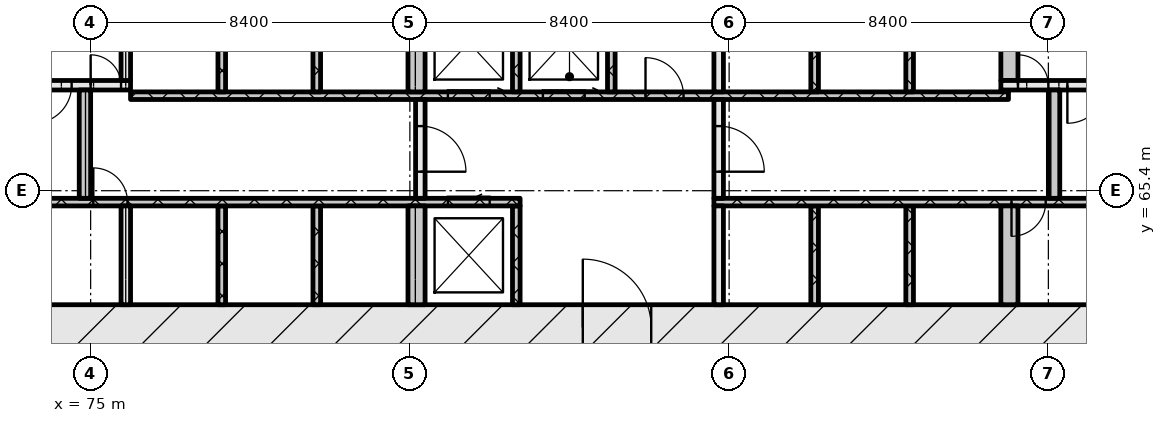
"""IFC4 building model, lengths in metres.
Left out: names, types, materials, properties, quantities, classifications, styles, units other than length and angle.
Written with IfcOpenShell. Run it as: python <this file> out.ifc"""

import sys

from ifc_helpers import new_model, si_unit, direction, frame, frame_2d, origin, place, context, subcontext, project, spatial, rectangle, extrude, element, fill, save


model = new_model("IFC4")
c1 = context("Model", 3, precision=1e-05, world=origin(), true_north=direction((0.0, 1.0)))
c2 = subcontext(c1, "Body", "Model", "MODEL_VIEW")
j1 = project(units=[si_unit("LENGTHUNIT", "METRE"), si_unit("PLANEANGLEUNIT", "RADIAN")], contexts=[c1])
p1 = place(None, origin())
s1 = spatial("IfcSite", under=j1, at=p1, CompositionType="ELEMENT")
p2 = place(p1, origin())
s2 = spatial("IfcBuilding", under=s1, at=p2, CompositionType="ELEMENT")
p3 = place(p2, frame((0.0, 0.0, 14.4)))
s3 = spatial("IfcBuildingStorey", under=s2, at=p3, CompositionType="ELEMENT", Elevation=14.4)
p4 = place(p3, frame((66.6, 61.8, 0.0), z_axis=(0.0, 0.0, 1.0), x_axis=(1.0, 0.0, 0.0)))
e1 = element("IfcWall", 1, at=p4, inside=s3, PredefinedType="SOLIDWALL", context=c2, shape_type="SweptSolid", body=[
    extrude(rectangle(XDim=42.0, YDim=1.2, at=frame_2d((21.0, 0.0))), origin(), (0.0, 0.0, 1.0), 4.5),
])
p5 = place(p4, frame((21.35, 0.0, 0.0)))
e2 = element("IfcOpeningElement", 2, at=p5, cuts=e1, PredefinedType="OPENING", context=c2, shape_type="SweptSolid", body=[
    extrude(rectangle(XDim=1.8, YDim=2.1, at=frame_2d((0.9, 1.05))), frame((0.0, 0.61, 0.0), z_axis=(0.0, -1.0, 0.0), x_axis=(1.0, 0.0, 0.0)), (0.0, 0.0, 1.0), 1.22),
])
p6 = place(p3, frame((75.925, 62.4, 0.0), z_axis=(0.0, 0.0, 1.0), x_axis=(0.0, 1.0, 0.0)))
e3 = element("IfcWall", 3, at=p6, inside=s3, PredefinedType="SOLIDWALL", context=c2, shape_type="SweptSolid", body=[
    extrude(rectangle(XDim=2.6, YDim=0.25, at=frame_2d((1.3, 0.0))), origin(), (0.0, 0.0, 1.0), 4.5),
])
for number, where, z_axis, x_axis in (
    (4, (78.45, 62.4, 0.0), (0.0, 0.0, 1.0), (0.0, 1.0, 0.0)),
    (5, (80.95, 62.4, 0.0), (0.0, 0.0, 1.0), (0.0, 1.0, 0.0)),
):
    element("IfcWall", number, at=place(p3, frame(where, z_axis=z_axis, x_axis=x_axis)), inside=s3, PredefinedType="SOLIDWALL", context=c2, shape_type="SweptSolid", body=[
        extrude(rectangle(XDim=2.6, YDim=0.2, at=frame_2d((1.3, 0.0))), origin(), (0.0, 0.0, 1.0), 4.5),
    ])
p7 = place(p3, frame((83.575, 62.4, 0.0), z_axis=(0.0, 0.0, 1.0), x_axis=(0.0, 1.0, 0.0)))
e6 = element("IfcWall", 6, at=p7, inside=s3, PredefinedType="SOLIDWALL", context=c2, shape_type="SweptSolid", body=[
    extrude(rectangle(XDim=2.6, YDim=0.45, at=frame_2d((1.3, 0.0))), origin(), (0.0, 0.0, 1.0), 4.5),
])
p8 = place(p3, frame((86.2, 62.4, 0.0), z_axis=(0.0, 0.0, 1.0), x_axis=(0.0, 1.0, 0.0)))
e7 = element("IfcWall", 7, at=p8, inside=s3, PredefinedType="SOLIDWALL", context=c2, shape_type="SweptSolid", body=[
    extrude(rectangle(XDim=2.6, YDim=0.2, at=frame_2d((1.3, 0.0))), origin(), (0.0, 0.0, 1.0), 4.5),
])
p9 = place(p3, frame((91.525, 62.4, 0.0), z_axis=(0.0, 0.0, 1.0), x_axis=(0.0, 1.0, 0.0)))
e8 = element("IfcWall", 8, at=p9, inside=s3, PredefinedType="SOLIDWALL", context=c2, shape_type="SweptSolid", body=[
    extrude(rectangle(XDim=2.6, YDim=0.25, at=frame_2d((1.3, 0.0))), origin(), (0.0, 0.0, 1.0), 4.5),
])
for number, where, z_axis, x_axis in (
    (9, (94.05, 62.4, 0.0), (0.0, 0.0, 1.0), (0.0, 1.0, 0.0)),
    (10, (96.55, 62.4, 0.0), (0.0, 0.0, 1.0), (0.0, 1.0, 0.0)),
):
    element("IfcWall", number, at=place(p3, frame(where, z_axis=z_axis, x_axis=x_axis)), inside=s3, PredefinedType="SOLIDWALL", context=c2, shape_type="SweptSolid", body=[
        extrude(rectangle(XDim=2.6, YDim=0.2, at=frame_2d((1.3, 0.0))), origin(), (0.0, 0.0, 1.0), 4.5),
    ])
p10 = place(p3, frame((99.175, 62.4, 0.0), z_axis=(0.0, 0.0, 1.0), x_axis=(0.0, 1.0, 0.0)))
e11 = element("IfcWall", 11, at=p10, inside=s3, PredefinedType="SOLIDWALL", context=c2, shape_type="SweptSolid", body=[
    extrude(rectangle(XDim=2.6, YDim=0.45, at=frame_2d((1.3, 0.0))), origin(), (0.0, 0.0, 1.0), 4.5),
])
p11 = place(p3, frame((67.8, 65.1, 0.0), z_axis=(0.0, 0.0, 1.0), x_axis=(1.0, 0.0, 0.0)))
e12 = element("IfcWall", 12, at=p11, inside=s3, PredefinedType="SOLIDWALL", context=c2, shape_type="SweptSolid", body=[
    extrude(rectangle(XDim=18.5, YDim=0.2, at=frame_2d((9.25, 0.0))), origin(), (0.0, 0.0, 1.0), 4.5),
])
p12 = place(p11, frame((7.27, 0.0, 0.0)))
e13 = element("IfcOpeningElement", 13, at=p12, cuts=e12, PredefinedType="OPENING", context=c2, shape_type="SweptSolid", body=[
    extrude(rectangle(XDim=0.9, YDim=2.1, at=frame_2d((0.45, 1.05))), frame((0.0, 0.11, 0.0), z_axis=(0.0, -1.0, 0.0), x_axis=(1.0, 0.0, 0.0)), (0.0, 0.0, 1.0), 0.22),
])
p13 = place(p11, frame((16.6, 0.0, 0.0)))
e14 = element("IfcOpeningElement", 14, at=p13, cuts=e12, PredefinedType="OPENING", context=c2, shape_type="SweptSolid", body=[
    extrude(rectangle(XDim=1.1, YDim=2.1, at=frame_2d((0.55, 1.05))), frame((0.0, 0.11, 0.0), z_axis=(0.0, -1.0, 0.0), x_axis=(1.0, 0.0, 0.0)), (0.0, 0.0, 1.0), 0.22),
])
p14 = place(p3, frame((91.4, 65.1, 0.0), z_axis=(0.0, 0.0, 1.0), x_axis=(1.0, 0.0, 0.0)))
e15 = element("IfcWall", 15, at=p14, inside=s3, PredefinedType="SOLIDWALL", context=c2, shape_type="SweptSolid", body=[
    extrude(rectangle(XDim=16.0, YDim=0.2, at=frame_2d((8.0, 0.0))), origin(), (0.0, 0.0, 1.0), 4.5),
])
p15 = place(p14, frame((7.83, 0.0, 0.0)))
e16 = element("IfcOpeningElement", 16, at=p15, cuts=e15, PredefinedType="OPENING", context=c2, shape_type="SweptSolid", body=[
    extrude(rectangle(XDim=0.9, YDim=2.1, at=frame_2d((0.45, 1.05))), frame((0.0, 0.11, 0.0), z_axis=(0.0, -1.0, 0.0), x_axis=(1.0, 0.0, 0.0)), (0.0, 0.0, 1.0), 0.22),
])
p16 = place(p3, frame((74.85, 65.2, 0.0), z_axis=(0.0, 0.0, 1.0), x_axis=(0.0, 1.0, 0.0)))
e17 = element("IfcWall", 17, at=p16, inside=s3, PredefinedType="SOLIDWALL", context=c2, shape_type="SweptSolid", body=[
    extrude(rectangle(XDim=2.85, YDim=0.3, at=frame_2d((1.425, 0.0))), origin(), (0.0, 0.0, 1.0), 4.5),
])
p17 = place(p3, frame((83.675, 65.2, 0.0), z_axis=(0.0, 0.0, 1.0), x_axis=(0.0, 1.0, 0.0)))
e18 = element("IfcWall", 18, at=p17, inside=s3, PredefinedType="SOLIDWALL", context=c2, shape_type="SweptSolid", body=[
    extrude(rectangle(XDim=2.6, YDim=0.25, at=frame_2d((1.3, 0.0))), origin(), (0.0, 0.0, 1.0), 4.5),
])
p18 = place(p17, frame((0.7, 0.0, 0.0)))
e19 = element("IfcOpeningElement", 19, at=p18, cuts=e18, PredefinedType="OPENING", context=c2, shape_type="SweptSolid", body=[
    extrude(rectangle(XDim=1.2, YDim=2.1, at=frame_2d((0.6, 1.05))), frame((0.0, 0.135, 0.0), z_axis=(0.0, -1.0, 0.0), x_axis=(1.0, 0.0, 0.0)), (0.0, 0.0, 1.0), 0.27),
])
p19 = place(p3, frame((91.525, 65.2, 0.0), z_axis=(0.0, 0.0, 1.0), x_axis=(0.0, 1.0, 0.0)))
e20 = element("IfcWall", 20, at=p19, inside=s3, PredefinedType="SOLIDWALL", context=c2, shape_type="SweptSolid", body=[
    extrude(rectangle(XDim=2.6, YDim=0.25, at=frame_2d((1.3, 0.0))), origin(), (0.0, 0.0, 1.0), 4.5),
])
p20 = place(p19, frame((0.7, 0.0, 0.0)))
e21 = element("IfcOpeningElement", 21, at=p20, cuts=e20, PredefinedType="OPENING", context=c2, shape_type="SweptSolid", body=[
    extrude(rectangle(XDim=1.2, YDim=2.1, at=frame_2d((0.6, 1.05))), frame((0.0, 0.135, 0.0), z_axis=(0.0, -1.0, 0.0), x_axis=(1.0, 0.0, 0.0)), (0.0, 0.0, 1.0), 0.27),
])
p21 = place(p3, frame((100.35, 65.2, 0.0), z_axis=(0.0, 0.0, 1.0), x_axis=(0.0, 1.0, 0.0)))
e22 = element("IfcWall", 22, at=p21, inside=s3, PredefinedType="SOLIDWALL", context=c2, shape_type="SweptSolid", body=[
    extrude(rectangle(XDim=2.85, YDim=0.3, at=frame_2d((1.425, 0.0))), origin(), (0.0, 0.0, 1.0), 4.5),
])
p22 = place(p3, frame((76.05, 67.9, 0.0), z_axis=(0.0, 0.0, 1.0), x_axis=(1.0, 0.0, 0.0)))
e23 = element("IfcWall", 23, at=p22, inside=s3, PredefinedType="SOLIDWALL", context=c2, shape_type="SweptSolid", body=[
    extrude(rectangle(XDim=23.1, YDim=0.2, at=frame_2d((11.55, 0.0))), origin(), (0.0, 0.0, 1.0), 4.5),
])
p23 = place(p22, frame((8.35, 0.0, 0.0)))
e24 = element("IfcOpeningElement", 24, at=p23, cuts=e23, PredefinedType="OPENING", context=c2, shape_type="SweptSolid", body=[
    extrude(rectangle(XDim=1.1, YDim=2.1, at=frame_2d((0.55, 1.05))), frame((0.0, 0.11, 0.0), z_axis=(0.0, -1.0, 0.0), x_axis=(1.0, 0.0, 0.0)), (0.0, 0.0, 1.0), 0.22),
])
p24 = place(p22, frame((10.85, 0.0, 0.0)))
e25 = element("IfcOpeningElement", 25, at=p24, cuts=e23, PredefinedType="OPENING", context=c2, shape_type="SweptSolid", body=[
    extrude(rectangle(XDim=1.1, YDim=2.1, at=frame_2d((0.55, 1.05))), frame((0.0, 0.11, 0.0), z_axis=(0.0, -1.0, 0.0), x_axis=(1.0, 0.0, 0.0)), (0.0, 0.0, 1.0), 0.22),
])
p25 = place(p22, frame((13.55, 0.0, 0.0)))
e26 = element("IfcOpeningElement", 26, at=p25, cuts=e23, PredefinedType="OPENING", context=c2, shape_type="SweptSolid", body=[
    extrude(rectangle(XDim=1.0, YDim=2.1, at=frame_2d((0.5, 1.05))), frame((0.0, 0.11, 0.0), z_axis=(0.0, -1.0, 0.0), x_axis=(1.0, 0.0, 0.0)), (0.0, 0.0, 1.0), 0.22),
])
for number, where, z_axis, x_axis in (
    (27, (78.45, 68.0, 0.0), (0.0, 0.0, 1.0), (0.0, 1.0, 0.0)),
    (28, (80.95, 68.0, 0.0), (0.0, 0.0, 1.0), (0.0, 1.0, 0.0)),
):
    element("IfcWall", number, at=place(p3, frame(where, z_axis=z_axis, x_axis=x_axis)), inside=s3, PredefinedType="SOLIDWALL", context=c2, shape_type="SweptSolid", body=[
        extrude(rectangle(XDim=2.6, YDim=0.2, at=frame_2d((1.3, 0.0))), origin(), (0.0, 0.0, 1.0), 4.5),
    ])
p26 = place(p3, frame((83.575, 68.0, 0.0), z_axis=(0.0, 0.0, 1.0), x_axis=(0.0, 1.0, 0.0)))
e29 = element("IfcWall", 29, at=p26, inside=s3, PredefinedType="SOLIDWALL", context=c2, shape_type="SweptSolid", body=[
    extrude(rectangle(XDim=2.6, YDim=0.45, at=frame_2d((1.3, 0.0))), origin(), (0.0, 0.0, 1.0), 4.5),
])
for number, where, z_axis, x_axis in (
    (30, (86.2, 68.0, 0.0), (0.0, 0.0, 1.0), (0.0, 1.0, 0.0)),
    (31, (88.7, 68.0, 0.0), (0.0, 0.0, 1.0), (0.0, 1.0, 0.0)),
):
    element("IfcWall", number, at=place(p3, frame(where, z_axis=z_axis, x_axis=x_axis)), inside=s3, PredefinedType="SOLIDWALL", context=c2, shape_type="SweptSolid", body=[
        extrude(rectangle(XDim=2.6, YDim=0.2, at=frame_2d((1.3, 0.0))), origin(), (0.0, 0.0, 1.0), 4.5),
    ])
p27 = place(p3, frame((91.525, 68.0, 0.0), z_axis=(0.0, 0.0, 1.0), x_axis=(0.0, 1.0, 0.0)))
e32 = element("IfcWall", 32, at=p27, inside=s3, PredefinedType="SOLIDWALL", context=c2, shape_type="SweptSolid", body=[
    extrude(rectangle(XDim=2.6, YDim=0.25, at=frame_2d((1.3, 0.0))), origin(), (0.0, 0.0, 1.0), 4.5),
])
for number, where, z_axis, x_axis in (
    (33, (94.05, 68.0, 0.0), (0.0, 0.0, 1.0), (0.0, 1.0, 0.0)),
    (34, (96.55, 68.0, 0.0), (0.0, 0.0, 1.0), (0.0, 1.0, 0.0)),
):
    element("IfcWall", number, at=place(p3, frame(where, z_axis=z_axis, x_axis=x_axis)), inside=s3, PredefinedType="SOLIDWALL", context=c2, shape_type="SweptSolid", body=[
        extrude(rectangle(XDim=2.6, YDim=0.2, at=frame_2d((1.3, 0.0))), origin(), (0.0, 0.0, 1.0), 4.5),
    ])
p28 = place(p3, frame((98.95, 68.025, 0.0), z_axis=(0.0, 0.0, 1.0), x_axis=(1.0, 0.0, 0.0)))
e35 = element("IfcWall", 35, at=p28, inside=s3, PredefinedType="SOLIDWALL", context=c2, shape_type="SweptSolid", body=[
    extrude(rectangle(XDim=0.2, YDim=0.05, at=frame_2d((0.1, 0.0))), origin(), (0.0, 0.0, 1.0), 4.5),
])
p29 = place(p3, frame((67.8, 68.175, 0.0), z_axis=(0.0, 0.0, 1.0), x_axis=(1.0, 0.0, 0.0)))
e36 = element("IfcWall", 36, at=p29, inside=s3, PredefinedType="SOLIDWALL", context=c2, shape_type="SweptSolid", body=[
    extrude(rectangle(XDim=8.25, YDim=0.25, at=frame_2d((4.125, 0.0))), origin(), (0.0, 0.0, 1.0), 4.5),
])
p30 = place(p29, frame((5.7, 0.0, 0.0)))
e37 = element("IfcOpeningElement", 37, at=p30, cuts=e36, PredefinedType="OPENING", context=c2, shape_type="SweptSolid", body=[
    extrude(rectangle(XDim=1.0, YDim=2.1, at=frame_2d((0.5, 1.05))), frame((0.0, 0.135, 0.0), z_axis=(0.0, -1.0, 0.0), x_axis=(1.0, 0.0, 0.0)), (0.0, 0.0, 1.0), 0.27),
])
p31 = place(p29, frame((7.2, 0.0, 0.0)))
e38 = element("IfcOpeningElement", 38, at=p31, cuts=e36, PredefinedType="OPENING", context=c2, shape_type="SweptSolid", body=[
    extrude(rectangle(XDim=0.8, YDim=2.1, at=frame_2d((0.4, 1.05))), frame((0.0, 0.135, 0.0), z_axis=(0.0, -1.0, 0.0), x_axis=(1.0, 0.0, 0.0)), (0.0, 0.0, 1.0), 0.27),
])
p32 = place(p3, frame((98.95, 68.175, 0.0), z_axis=(0.0, 0.0, 1.0), x_axis=(1.0, 0.0, 0.0)))
e39 = element("IfcWall", 39, at=p32, inside=s3, PredefinedType="SOLIDWALL", context=c2, shape_type="SweptSolid", body=[
    extrude(rectangle(XDim=8.45, YDim=0.25, at=frame_2d((4.225, 0.0))), origin(), (0.0, 0.0, 1.0), 4.5),
])
p33 = place(p32, frame((0.45, 0.0, 0.0)))
e40 = element("IfcOpeningElement", 40, at=p33, cuts=e39, PredefinedType="OPENING", context=c2, shape_type="SweptSolid", body=[
    extrude(rectangle(XDim=0.8, YDim=2.1, at=frame_2d((0.4, 1.05))), frame((0.0, 0.135, 0.0), z_axis=(0.0, -1.0, 0.0), x_axis=(1.0, 0.0, 0.0)), (0.0, 0.0, 1.0), 0.27),
])
p34 = place(p32, frame((1.75, 0.0, 0.0)))
e41 = element("IfcOpeningElement", 41, at=p34, cuts=e39, PredefinedType="OPENING", context=c2, shape_type="SweptSolid", body=[
    extrude(rectangle(XDim=1.0, YDim=2.1, at=frame_2d((0.5, 1.05))), frame((0.0, 0.135, 0.0), z_axis=(0.0, -1.0, 0.0), x_axis=(1.0, 0.0, 0.0)), (0.0, 0.0, 1.0), 0.27),
])
p35 = place(p3, frame((75.925, 68.3, 0.0), z_axis=(0.0, 0.0, 1.0), x_axis=(0.0, 1.0, 0.0)))
e42 = element("IfcWall", 42, at=p35, inside=s3, PredefinedType="SOLIDWALL", context=c2, shape_type="SweptSolid", body=[
    extrude(rectangle(XDim=2.3, YDim=0.25, at=frame_2d((1.15, 0.0))), origin(), (0.0, 0.0, 1.0), 4.5),
])
p36 = place(p3, frame((99.175, 68.3, 0.0), z_axis=(0.0, 0.0, 1.0), x_axis=(0.0, 1.0, 0.0)))
e43 = element("IfcWall", 43, at=p36, inside=s3, PredefinedType="SOLIDWALL", context=c2, shape_type="SweptSolid", body=[
    extrude(rectangle(XDim=2.3, YDim=0.45, at=frame_2d((1.15, 0.0))), origin(), (0.0, 0.0, 1.0), 4.5),
])
p37 = place(p5, origin())
e44 = element("IfcDoor", 44, at=p37, inside=s3, OperationType="DOUBLE_DOOR_SINGLE_SWING", PredefinedType="DOOR", context=c2, shape_type="SweptSolid", body=[
    extrude(rectangle(XDim=1.8, YDim=2.1, at=frame_2d((0.9, 1.05))), frame((0.0, 0.025, 0.0), z_axis=(0.0, -1.0, 0.0), x_axis=(1.0, 0.0, 0.0)), (0.0, 0.0, 1.0), 0.05),
])
fill(e2, e44)
p38 = place(p12, origin())
e45 = element("IfcDoor", 45, at=p38, inside=s3, OperationType="SINGLE_SWING_LEFT", PredefinedType="DOOR", context=c2, shape_type="SweptSolid", body=[
    extrude(rectangle(XDim=0.9, YDim=2.1, at=frame_2d((0.45, 1.05))), frame((0.0, 0.025, 0.0), z_axis=(0.0, -1.0, 0.0), x_axis=(1.0, 0.0, 0.0)), (0.0, 0.0, 1.0), 0.05),
])
fill(e13, e45)
p39 = place(p13, origin())
e46 = element("IfcDoor", 46, at=p39, inside=s3, OperationType="SLIDING_TO_LEFT", PredefinedType="DOOR", context=c2, shape_type="SweptSolid", body=[
    extrude(rectangle(XDim=1.1, YDim=2.1, at=frame_2d((0.55, 1.05))), frame((0.0, 0.025, 0.0), z_axis=(0.0, -1.0, 0.0), x_axis=(1.0, 0.0, 0.0)), (0.0, 0.0, 1.0), 0.05),
])
fill(e14, e46)
p40 = place(p15, origin())
e47 = element("IfcDoor", 47, at=p40, inside=s3, OperationType="SINGLE_SWING_RIGHT", PredefinedType="DOOR", context=c2, shape_type="SweptSolid", body=[
    extrude(rectangle(XDim=0.9, YDim=2.1, at=frame_2d((0.45, 1.05))), frame((0.0, 0.025, 0.0), z_axis=(0.0, -1.0, 0.0), x_axis=(1.0, 0.0, 0.0)), (0.0, 0.0, 1.0), 0.05),
])
fill(e16, e47)
p41 = place(p18, origin())
e48 = element("IfcDoor", 48, at=p41, inside=s3, OperationType="SINGLE_SWING_RIGHT", PredefinedType="DOOR", context=c2, shape_type="SweptSolid", body=[
    extrude(rectangle(XDim=1.2, YDim=2.1, at=frame_2d((0.6, 1.05))), frame((0.0, 0.025, 0.0), z_axis=(0.0, -1.0, 0.0), x_axis=(1.0, 0.0, 0.0)), (0.0, 0.0, 1.0), 0.05),
])
fill(e19, e48)
p42 = place(p20, origin())
e49 = element("IfcDoor", 49, at=p42, inside=s3, OperationType="SINGLE_SWING_RIGHT", PredefinedType="DOOR", context=c2, shape_type="SweptSolid", body=[
    extrude(rectangle(XDim=1.2, YDim=2.1, at=frame_2d((0.6, 1.05))), frame((0.0, 0.025, 0.0), z_axis=(0.0, -1.0, 0.0), x_axis=(1.0, 0.0, 0.0)), (0.0, 0.0, 1.0), 0.05),
])
fill(e21, e49)
p43 = place(p23, origin())
e50 = element("IfcDoor", 50, at=p43, inside=s3, OperationType="SLIDING_TO_RIGHT", PredefinedType="DOOR", context=c2, shape_type="SweptSolid", body=[
    extrude(rectangle(XDim=1.1, YDim=2.1, at=frame_2d((0.55, 1.05))), frame((0.0, 0.025, 0.0), z_axis=(0.0, -1.0, 0.0), x_axis=(1.0, 0.0, 0.0)), (0.0, 0.0, 1.0), 0.05),
])
fill(e24, e50)
p44 = place(p24, origin())
e51 = element("IfcDoor", 51, at=p44, inside=s3, OperationType="SLIDING_TO_RIGHT", PredefinedType="DOOR", context=c2, shape_type="SweptSolid", body=[
    extrude(rectangle(XDim=1.1, YDim=2.1, at=frame_2d((0.55, 1.05))), frame((0.0, 0.025, 0.0), z_axis=(0.0, -1.0, 0.0), x_axis=(1.0, 0.0, 0.0)), (0.0, 0.0, 1.0), 0.05),
])
fill(e25, e51)
p45 = place(p25, origin())
e52 = element("IfcDoor", 52, at=p45, inside=s3, OperationType="SINGLE_SWING_LEFT", PredefinedType="DOOR", context=c2, shape_type="SweptSolid", body=[
    extrude(rectangle(XDim=1.0, YDim=2.1, at=frame_2d((0.5, 1.05))), frame((0.0, 0.025, 0.0), z_axis=(0.0, -1.0, 0.0), x_axis=(1.0, 0.0, 0.0)), (0.0, 0.0, 1.0), 0.05),
])
fill(e26, e52)
p46 = place(p30, origin())
e53 = element("IfcDoor", 53, at=p46, inside=s3, OperationType="SINGLE_SWING_RIGHT", PredefinedType="DOOR", context=c2, shape_type="SweptSolid", body=[
    extrude(rectangle(XDim=1.0, YDim=2.1, at=frame_2d((0.5, 1.05))), frame((0.0, 0.025, 0.0), z_axis=(0.0, -1.0, 0.0), x_axis=(1.0, 0.0, 0.0)), (0.0, 0.0, 1.0), 0.05),
])
fill(e37, e53)
p47 = place(p31, origin())
e54 = element("IfcDoor", 54, at=p47, inside=s3, OperationType="SINGLE_SWING_LEFT", PredefinedType="DOOR", context=c2, shape_type="SweptSolid", body=[
    extrude(rectangle(XDim=0.8, YDim=2.1, at=frame_2d((0.4, 1.05))), frame((0.0, 0.025, 0.0), z_axis=(0.0, -1.0, 0.0), x_axis=(1.0, 0.0, 0.0)), (0.0, 0.0, 1.0), 0.05),
])
fill(e38, e54)
p48 = place(p33, origin())
e55 = element("IfcDoor", 55, at=p48, inside=s3, OperationType="SINGLE_SWING_LEFT", PredefinedType="DOOR", context=c2, shape_type="SweptSolid", body=[
    extrude(rectangle(XDim=0.8, YDim=2.1, at=frame_2d((0.4, 1.05))), frame((0.0, 0.025, 0.0), z_axis=(0.0, -1.0, 0.0), x_axis=(1.0, 0.0, 0.0)), (0.0, 0.0, 1.0), 0.05),
])
fill(e40, e55)
p49 = place(p34, origin())
e56 = element("IfcDoor", 56, at=p49, inside=s3, OperationType="SINGLE_SWING_RIGHT", PredefinedType="DOOR", context=c2, shape_type="SweptSolid", body=[
    extrude(rectangle(XDim=1.0, YDim=2.1, at=frame_2d((0.5, 1.05))), frame((0.0, 0.025, 0.0), z_axis=(0.0, -1.0, 0.0), x_axis=(1.0, 0.0, 0.0)), (0.0, 0.0, 1.0), 0.05),
])
fill(e41, e56)
save(model, sys.argv[1])
